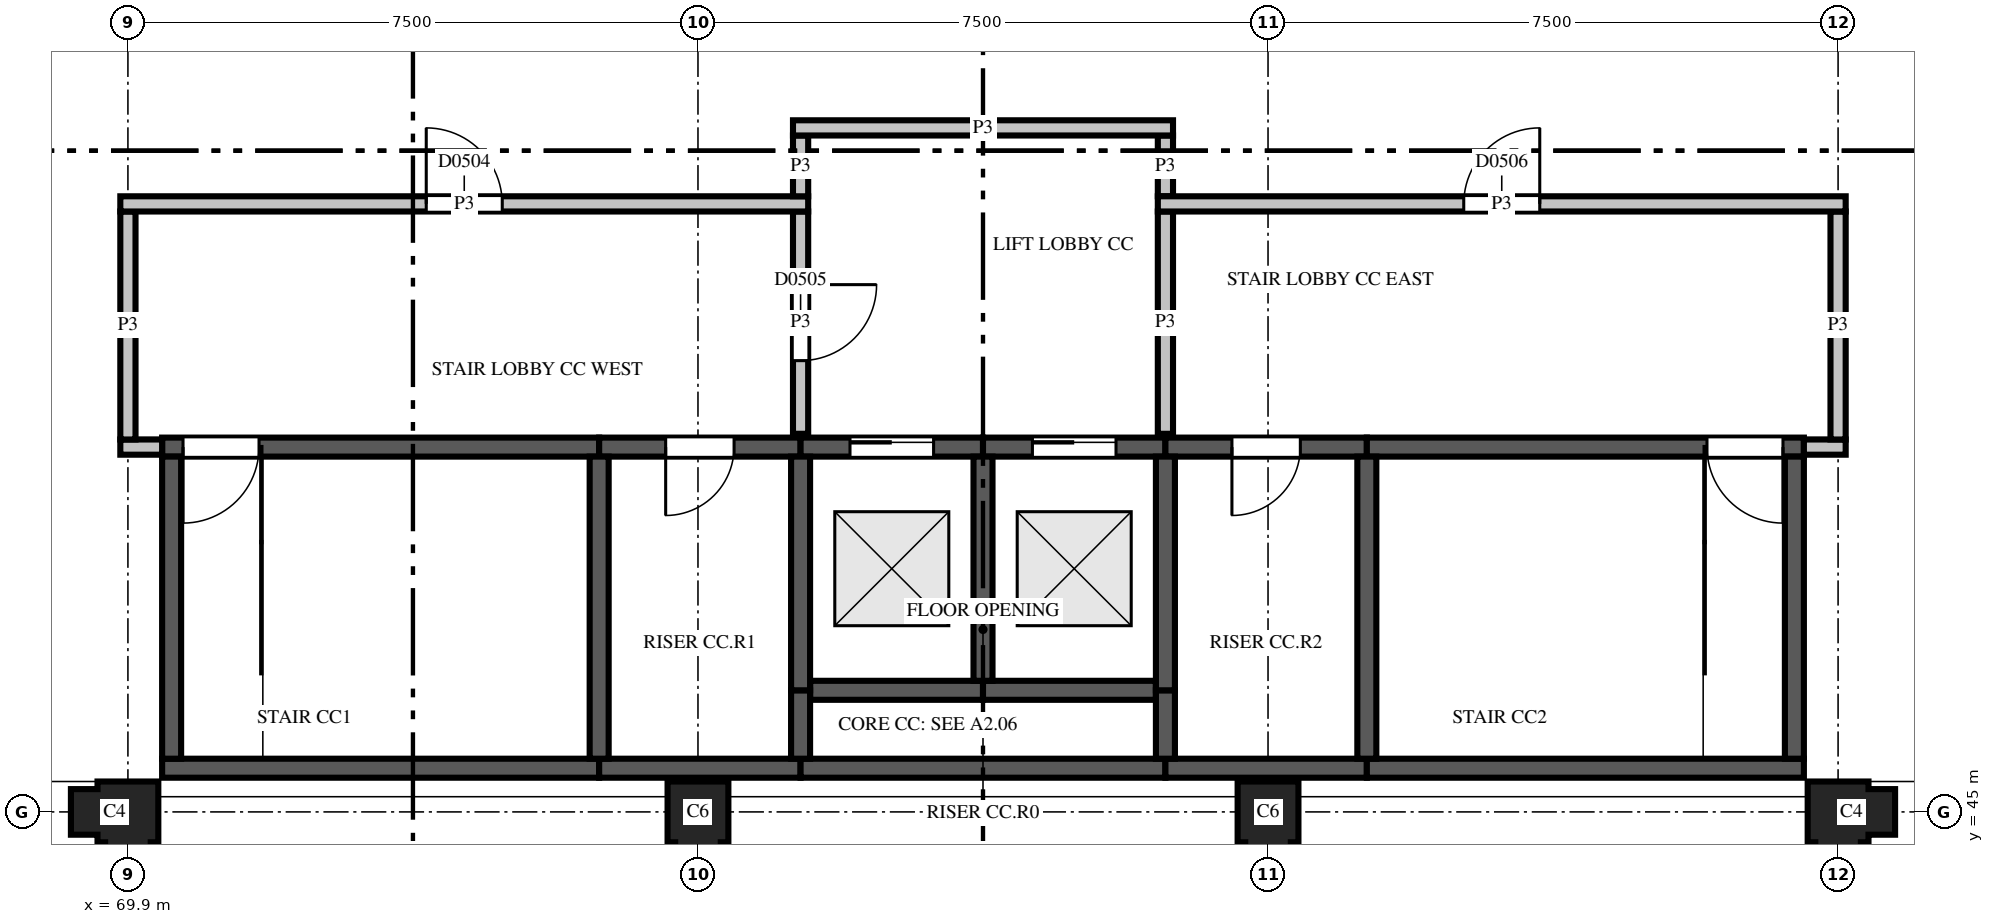
"""IFC4 building model, lengths in metres.
Left out: names, types, materials, properties, quantities, classifications, styles, units other than length and angle.
Written with IfcOpenShell. Run it as: python <this file> out.ifc"""

import sys

from ifc_helpers import new_model, si_unit, direction, frame, frame_2d, origin, place, context, subcontext, project, spatial, polyline, rectangle, outline, extrude, element, fill, save


model = new_model("IFC4")
c1 = context("Model", 3, precision=1e-05, world=origin(), true_north=direction((0.0, 1.0)))
c2 = subcontext(c1, "Body", "Model", "MODEL_VIEW")
j1 = project(units=[si_unit("LENGTHUNIT", "METRE"), si_unit("PLANEANGLEUNIT", "RADIAN")], contexts=[c1])
p1 = place(None, origin())
s1 = spatial("IfcSite", under=j1, at=p1, CompositionType="ELEMENT")
p2 = place(p1, origin())
s2 = spatial("IfcBuilding", under=s1, at=p2, CompositionType="ELEMENT")
p3 = place(p2, frame((0.0, 0.0, 19.3)))
s3 = spatial("IfcBuildingStorey", under=s2, at=p3, CompositionType="ELEMENT", Elevation=19.3)
p4 = place(p3, frame((69.9, 45.0, 0.0), z_axis=(0.0, 0.0, 1.0), x_axis=(-1.0, 0.0, 0.0)))
e1 = element("IfcColumn", 1, at=p4, inside=s3, PredefinedType="COLUMN", context=c2, shape_type="SweptSolid", body=[
    extrude(outline(polyline([(-0.4, -0.4), (0.4, -0.4), (0.4, -0.3), (0.75, -0.3), (0.75, 0.3), (0.4, 0.3), (0.4, 0.4), (0.3, 0.4), (0.3, 0.75), (-0.3, 0.75), (-0.3, 0.4), (-0.4, 0.4), (-0.4, -0.4)])), origin(), (0.0, 0.0, 1.0), 3.7),
])
for number, where, z_axis, x_axis in (
    (2, (77.4, 45.0, 0.0), (0.0, 0.0, 1.0), (0.0, -1.0, 0.0)),
    (3, (84.9, 45.0, 0.0), (0.0, 0.0, 1.0), (0.0, -1.0, 0.0)),
):
    element("IfcColumn", number, at=place(p3, frame(where, z_axis=z_axis, x_axis=x_axis)), inside=s3, PredefinedType="COLUMN", context=c2, shape_type="SweptSolid", body=[
        extrude(outline(polyline([(-0.4, -0.4), (0.4, -0.4), (0.4, -0.3), (0.75, -0.3), (0.75, 0.3), (0.4, 0.3), (0.4, 0.4), (-0.4, 0.4), (-0.4, -0.4)])), origin(), (0.0, 0.0, 1.0), 3.7),
    ])
p5 = place(p3, frame((92.4, 45.0, 0.0), z_axis=(0.0, 0.0, 1.0), x_axis=(0.0, -1.0, 0.0)))
e4 = element("IfcColumn", 4, at=p5, inside=s3, PredefinedType="COLUMN", context=c2, shape_type="SweptSolid", body=[
    extrude(outline(polyline([(-0.4, -0.4), (0.4, -0.4), (0.4, -0.3), (0.75, -0.3), (0.75, 0.3), (0.4, 0.3), (0.4, 0.4), (0.3, 0.4), (0.3, 0.75), (-0.3, 0.75), (-0.3, 0.4), (-0.4, 0.4), (-0.4, -0.4)])), origin(), (0.0, 0.0, 1.0), 3.7),
])
p6 = place(p3, frame((70.35, 45.575, 0.0), z_axis=(0.0, 0.0, 1.0), x_axis=(1.0, 0.0, 0.0)))
e5 = element("IfcWall", 5, at=p6, inside=s3, PredefinedType="SHEAR", context=c2, shape_type="SweptSolid", body=[
    extrude(rectangle(XDim=5.75, YDim=0.25, at=frame_2d((2.875, 0.0))), origin(), (0.0, 0.0, 1.0), 3.45),
])
p7 = place(p3, frame((76.1, 45.575, 0.0), z_axis=(0.0, 0.0, 1.0), x_axis=(1.0, 0.0, 0.0)))
e6 = element("IfcWall", 6, at=p7, inside=s3, PredefinedType="SHEAR", context=c2, shape_type="SweptSolid", body=[
    extrude(rectangle(XDim=2.65, YDim=0.25, at=frame_2d((1.325, 0.0))), origin(), (0.0, 0.0, 1.0), 3.45),
])
p8 = place(p3, frame((78.75, 45.575, 0.0), z_axis=(0.0, 0.0, 1.0), x_axis=(1.0, 0.0, 0.0)))
e7 = element("IfcWall", 7, at=p8, inside=s3, PredefinedType="SHEAR", context=c2, shape_type="SweptSolid", body=[
    extrude(rectangle(XDim=4.8, YDim=0.25, at=frame_2d((2.4, 0.0))), origin(), (0.0, 0.0, 1.0), 3.45),
])
p9 = place(p3, frame((83.55, 45.575, 0.0), z_axis=(0.0, 0.0, 1.0), x_axis=(1.0, 0.0, 0.0)))
e8 = element("IfcWall", 8, at=p9, inside=s3, PredefinedType="SHEAR", context=c2, shape_type="SweptSolid", body=[
    extrude(rectangle(XDim=2.65, YDim=0.25, at=frame_2d((1.325, 0.0))), origin(), (0.0, 0.0, 1.0), 3.45),
])
p10 = place(p3, frame((86.2, 45.575, 0.0), z_axis=(0.0, 0.0, 1.0), x_axis=(1.0, 0.0, 0.0)))
e9 = element("IfcWall", 9, at=p10, inside=s3, PredefinedType="SHEAR", context=c2, shape_type="SweptSolid", body=[
    extrude(rectangle(XDim=5.75, YDim=0.25, at=frame_2d((2.875, 0.0))), origin(), (0.0, 0.0, 1.0), 3.45),
])
p11 = place(p3, frame((78.875, 46.6, 0.0), z_axis=(0.0, 0.0, 1.0), x_axis=(1.0, 0.0, 0.0)))
e10 = element("IfcWall", 10, at=p11, inside=s3, PredefinedType="SHEAR", context=c2, shape_type="SweptSolid", body=[
    extrude(rectangle(XDim=2.275, YDim=0.25, at=frame_2d((1.137, 0.0))), origin(), (0.0, 0.0, 1.0), 4.95),
])
p12 = place(p3, frame((81.15, 46.6, 0.0), z_axis=(0.0, 0.0, 1.0), x_axis=(1.0, 0.0, 0.0)))
e11 = element("IfcWall", 11, at=p12, inside=s3, PredefinedType="SHEAR", context=c2, shape_type="SweptSolid", body=[
    extrude(rectangle(XDim=2.275, YDim=0.25, at=frame_2d((1.138, 0.0))), origin(), (0.0, 0.0, 1.0), 4.95),
])
p13 = place(p3, frame((70.35, 49.8, 0.0), z_axis=(0.0, 0.0, 1.0), x_axis=(1.0, 0.0, 0.0)))
e12 = element("IfcWall", 12, at=p13, inside=s3, PredefinedType="SHEAR", context=c2, shape_type="SweptSolid", body=[
    extrude(rectangle(XDim=5.75, YDim=0.25, at=frame_2d((2.875, 0.0))), origin(), (0.0, 0.0, 1.0), 3.45),
])
p14 = place(p13, frame((0.275, 0.0, 0.0)))
e13 = element("IfcOpeningElement", 13, at=p14, cuts=e12, PredefinedType="OPENING", context=c2, shape_type="SweptSolid", body=[
    extrude(rectangle(XDim=1.0, YDim=2.1, at=frame_2d((0.5, 1.05))), frame((0.0, 0.135, 0.0), z_axis=(0.0, -1.0, 0.0), x_axis=(1.0, 0.0, 0.0)), (0.0, 0.0, 1.0), 0.27),
])
p15 = place(p3, frame((76.1, 49.8, 0.0), z_axis=(0.0, 0.0, 1.0), x_axis=(1.0, 0.0, 0.0)))
e14 = element("IfcWall", 14, at=p15, inside=s3, PredefinedType="SHEAR", context=c2, shape_type="SweptSolid", body=[
    extrude(rectangle(XDim=2.65, YDim=0.25, at=frame_2d((1.325, 0.0))), origin(), (0.0, 0.0, 1.0), 3.45),
])
p16 = place(p15, frame((0.875, 0.0, 0.0)))
e15 = element("IfcOpeningElement", 15, at=p16, cuts=e14, PredefinedType="OPENING", context=c2, shape_type="SweptSolid", body=[
    extrude(rectangle(XDim=0.9, YDim=2.1, at=frame_2d((0.45, 1.05))), frame((0.0, 0.135, 0.0), z_axis=(0.0, -1.0, 0.0), x_axis=(1.0, 0.0, 0.0)), (0.0, 0.0, 1.0), 0.27),
])
p17 = place(p3, frame((78.75, 49.8, 0.0), z_axis=(0.0, 0.0, 1.0), x_axis=(1.0, 0.0, 0.0)))
e16 = element("IfcWall", 16, at=p17, inside=s3, PredefinedType="SHEAR", context=c2, shape_type="SweptSolid", body=[
    extrude(rectangle(XDim=2.4, YDim=0.25, at=frame_2d((1.2, 0.0))), origin(), (0.0, 0.0, 1.0), 4.95),
])
p18 = place(p17, frame((0.65, 0.0, 0.0)))
e17 = element("IfcOpeningElement", 17, at=p18, cuts=e16, PredefinedType="OPENING", context=c2, shape_type="SweptSolid", body=[
    extrude(rectangle(XDim=1.1, YDim=2.1, at=frame_2d((0.55, 1.05))), frame((0.0, 0.135, 0.0), z_axis=(0.0, -1.0, 0.0), x_axis=(1.0, 0.0, 0.0)), (0.0, 0.0, 1.0), 0.27),
])
p19 = place(p3, frame((81.15, 49.8, 0.0), z_axis=(0.0, 0.0, 1.0), x_axis=(1.0, 0.0, 0.0)))
e18 = element("IfcWall", 18, at=p19, inside=s3, PredefinedType="SHEAR", context=c2, shape_type="SweptSolid", body=[
    extrude(rectangle(XDim=2.4, YDim=0.25, at=frame_2d((1.2, 0.0))), origin(), (0.0, 0.0, 1.0), 4.95),
])
p20 = place(p19, frame((0.65, 0.0, 0.0)))
e19 = element("IfcOpeningElement", 19, at=p20, cuts=e18, PredefinedType="OPENING", context=c2, shape_type="SweptSolid", body=[
    extrude(rectangle(XDim=1.1, YDim=2.1, at=frame_2d((0.55, 1.05))), frame((0.0, 0.135, 0.0), z_axis=(0.0, -1.0, 0.0), x_axis=(1.0, 0.0, 0.0)), (0.0, 0.0, 1.0), 0.27),
])
p21 = place(p3, frame((83.55, 49.8, 0.0), z_axis=(0.0, 0.0, 1.0), x_axis=(1.0, 0.0, 0.0)))
e20 = element("IfcWall", 20, at=p21, inside=s3, PredefinedType="SHEAR", context=c2, shape_type="SweptSolid", body=[
    extrude(rectangle(XDim=2.65, YDim=0.25, at=frame_2d((1.325, 0.0))), origin(), (0.0, 0.0, 1.0), 3.45),
])
p22 = place(p21, frame((0.875, 0.0, 0.0)))
e21 = element("IfcOpeningElement", 21, at=p22, cuts=e20, PredefinedType="OPENING", context=c2, shape_type="SweptSolid", body=[
    extrude(rectangle(XDim=0.9, YDim=2.1, at=frame_2d((0.45, 1.05))), frame((0.0, 0.135, 0.0), z_axis=(0.0, -1.0, 0.0), x_axis=(1.0, 0.0, 0.0)), (0.0, 0.0, 1.0), 0.27),
])
p23 = place(p3, frame((86.2, 49.8, 0.0), z_axis=(0.0, 0.0, 1.0), x_axis=(1.0, 0.0, 0.0)))
e22 = element("IfcWall", 22, at=p23, inside=s3, PredefinedType="SHEAR", context=c2, shape_type="SweptSolid", body=[
    extrude(rectangle(XDim=5.75, YDim=0.25, at=frame_2d((2.875, 0.0))), origin(), (0.0, 0.0, 1.0), 3.45),
])
p24 = place(p23, frame((4.475, 0.0, 0.0)))
e23 = element("IfcOpeningElement", 23, at=p24, cuts=e22, PredefinedType="OPENING", context=c2, shape_type="SweptSolid", body=[
    extrude(rectangle(XDim=1.0, YDim=2.1, at=frame_2d((0.5, 1.05))), frame((0.0, 0.135, 0.0), z_axis=(0.0, -1.0, 0.0), x_axis=(1.0, 0.0, 0.0)), (0.0, 0.0, 1.0), 0.27),
])
for number, where, z_axis, x_axis in (
    (24, (70.475, 45.7, 0.0), (0.0, 0.0, 1.0), (0.0, 1.0, 0.0)),
    (25, (76.1, 45.7, 0.0), (0.0, 0.0, 1.0), (0.0, 1.0, 0.0)),
):
    element("IfcWall", number, at=place(p3, frame(where, z_axis=z_axis, x_axis=x_axis)), inside=s3, PredefinedType="SHEAR", context=c2, shape_type="SweptSolid", body=[
        extrude(rectangle(XDim=3.975, YDim=0.25, at=frame_2d((1.988, 0.0))), origin(), (0.0, 0.0, 1.0), 3.45),
    ])
p25 = place(p3, frame((78.75, 45.7, 0.0), z_axis=(0.0, 0.0, 1.0), x_axis=(0.0, 1.0, 0.0)))
e26 = element("IfcWall", 26, at=p25, inside=s3, PredefinedType="SHEAR", context=c2, shape_type="SweptSolid", body=[
    extrude(rectangle(XDim=0.9, YDim=0.25, at=frame_2d((0.45, 0.0))), origin(), (0.0, 0.0, 1.0), 3.45),
])
p26 = place(p3, frame((78.75, 46.6, 0.0), z_axis=(0.0, 0.0, 1.0), x_axis=(0.0, 1.0, 0.0)))
e27 = element("IfcWall", 27, at=p26, inside=s3, PredefinedType="SHEAR", context=c2, shape_type="SweptSolid", body=[
    extrude(rectangle(XDim=3.075, YDim=0.25, at=frame_2d((1.538, 0.0))), origin(), (0.0, 0.0, 1.0), 4.95),
])
p27 = place(p3, frame((81.15, 46.725, 0.0), z_axis=(0.0, 0.0, 1.0), x_axis=(0.0, 1.0, 0.0)))
e28 = element("IfcWall", 28, at=p27, inside=s3, PredefinedType="SHEAR", context=c2, shape_type="SweptSolid", body=[
    extrude(rectangle(XDim=2.95, YDim=0.25, at=frame_2d((1.475, 0.0))), origin(), (0.0, 0.0, 1.0), 4.95),
])
p28 = place(p3, frame((83.55, 45.7, 0.0), z_axis=(0.0, 0.0, 1.0), x_axis=(0.0, 1.0, 0.0)))
e29 = element("IfcWall", 29, at=p28, inside=s3, PredefinedType="SHEAR", context=c2, shape_type="SweptSolid", body=[
    extrude(rectangle(XDim=0.9, YDim=0.25, at=frame_2d((0.45, 0.0))), origin(), (0.0, 0.0, 1.0), 3.45),
])
p29 = place(p3, frame((83.55, 46.6, 0.0), z_axis=(0.0, 0.0, 1.0), x_axis=(0.0, 1.0, 0.0)))
e30 = element("IfcWall", 30, at=p29, inside=s3, PredefinedType="SHEAR", context=c2, shape_type="SweptSolid", body=[
    extrude(rectangle(XDim=3.075, YDim=0.25, at=frame_2d((1.538, 0.0))), origin(), (0.0, 0.0, 1.0), 4.95),
])
for number, where, z_axis, x_axis in (
    (31, (86.2, 45.7, 0.0), (0.0, 0.0, 1.0), (0.0, 1.0, 0.0)),
    (32, (91.825, 45.7, 0.0), (0.0, 0.0, 1.0), (0.0, 1.0, 0.0)),
):
    element("IfcWall", number, at=place(p3, frame(where, z_axis=z_axis, x_axis=x_axis)), inside=s3, PredefinedType="SHEAR", context=c2, shape_type="SweptSolid", body=[
        extrude(rectangle(XDim=3.975, YDim=0.25, at=frame_2d((1.988, 0.0))), origin(), (0.0, 0.0, 1.0), 3.45),
    ])
for number, where, z_axis, x_axis in (
    (33, (69.8, 49.8, 0.0), (0.0, 0.0, 1.0), (1.0, 0.0, 0.0)),
    (34, (91.95, 49.8, 0.0), (0.0, 0.0, 1.0), (1.0, 0.0, 0.0)),
):
    element("IfcWall", number, at=place(p3, frame(where, z_axis=z_axis, x_axis=x_axis)), inside=s3, PredefinedType="PARTITIONING", context=c2, shape_type="SweptSolid", body=[
        extrude(rectangle(XDim=0.55, YDim=0.2, at=frame_2d((0.275, 0.0))), origin(), (0.0, 0.0, 1.0), 2.88),
    ])
p30 = place(p3, frame((92.4, 49.9, 0.0), z_axis=(0.0, 0.0, 1.0), x_axis=(0.0, 1.0, 0.0)))
e35 = element("IfcWall", 35, at=p30, inside=s3, PredefinedType="PARTITIONING", context=c2, shape_type="SweptSolid", body=[
    extrude(rectangle(XDim=3.0, YDim=0.2, at=frame_2d((1.5, 0.0))), origin(), (0.0, 0.0, 1.0), 2.88),
])
p31 = place(p3, frame((78.75, 49.975, 0.0), z_axis=(0.0, 0.0, 1.0), x_axis=(0.0, 1.0, 0.0)))
e36 = element("IfcWall", 36, at=p31, inside=s3, PredefinedType="PARTITIONING", context=c2, shape_type="SweptSolid", body=[
    extrude(rectangle(XDim=2.925, YDim=0.2, at=frame_2d((1.462, 0.0))), origin(), (0.0, 0.0, 1.0), 2.88),
])
p32 = place(p31, frame((0.962, 0.0, 0.0)))
e37 = element("IfcOpeningElement", 37, at=p32, cuts=e36, PredefinedType="OPENING", context=c2, shape_type="SweptSolid", body=[
    extrude(rectangle(XDim=1.0, YDim=2.1, at=frame_2d((0.5, 1.05))), frame((0.0, 0.11, 0.0), z_axis=(0.0, -1.0, 0.0), x_axis=(1.0, 0.0, 0.0)), (0.0, 0.0, 1.0), 0.22),
])
p33 = place(p3, frame((83.55, 49.975, 0.0), z_axis=(0.0, 0.0, 1.0), x_axis=(0.0, 1.0, 0.0)))
e38 = element("IfcWall", 38, at=p33, inside=s3, PredefinedType="PARTITIONING", context=c2, shape_type="SweptSolid", body=[
    extrude(rectangle(XDim=2.925, YDim=0.2, at=frame_2d((1.462, 0.0))), origin(), (0.0, 0.0, 1.0), 2.88),
])
p34 = place(p3, frame((69.9, 52.9, 0.0), z_axis=(0.0, 0.0, 1.0), x_axis=(0.0, -1.0, 0.0)))
e39 = element("IfcWall", 39, at=p34, inside=s3, PredefinedType="PARTITIONING", context=c2, shape_type="SweptSolid", body=[
    extrude(rectangle(XDim=3.0, YDim=0.2, at=frame_2d((1.5, 0.0))), origin(), (0.0, 0.0, 1.0), 2.88),
])
p35 = place(p3, frame((78.85, 53.0, 0.0), z_axis=(0.0, 0.0, 1.0), x_axis=(-1.0, 0.0, 0.0)))
e40 = element("IfcWall", 40, at=p35, inside=s3, PredefinedType="PARTITIONING", context=c2, shape_type="SweptSolid", body=[
    extrude(rectangle(XDim=9.05, YDim=0.2, at=frame_2d((4.525, 0.0))), origin(), (0.0, 0.0, 1.0), 2.88),
])
p36 = place(p35, frame((4.025, 0.0, 0.0)))
e41 = element("IfcOpeningElement", 41, at=p36, cuts=e40, PredefinedType="OPENING", context=c2, shape_type="SweptSolid", body=[
    extrude(rectangle(XDim=1.0, YDim=2.1, at=frame_2d((0.5, 1.05))), frame((0.0, 0.11, 0.0), z_axis=(0.0, -1.0, 0.0), x_axis=(1.0, 0.0, 0.0)), (0.0, 0.0, 1.0), 0.22),
])
p37 = place(p3, frame((83.55, 53.1, 0.0), z_axis=(0.0, 0.0, 1.0), x_axis=(0.0, 1.0, 0.0)))
e42 = element("IfcWall", 42, at=p37, inside=s3, PredefinedType="PARTITIONING", context=c2, shape_type="SweptSolid", body=[
    extrude(rectangle(XDim=0.8, YDim=0.2, at=frame_2d((0.4, 0.0))), origin(), (0.0, 0.0, 1.0), 2.88),
])
p38 = place(p3, frame((92.5, 53.0, 0.0), z_axis=(0.0, 0.0, 1.0), x_axis=(-1.0, 0.0, 0.0)))
e43 = element("IfcWall", 43, at=p38, inside=s3, PredefinedType="PARTITIONING", context=c2, shape_type="SweptSolid", body=[
    extrude(rectangle(XDim=9.05, YDim=0.2, at=frame_2d((4.525, 0.0))), origin(), (0.0, 0.0, 1.0), 2.88),
])
p39 = place(p38, frame((4.025, 0.0, 0.0)))
e44 = element("IfcOpeningElement", 44, at=p39, cuts=e43, PredefinedType="OPENING", context=c2, shape_type="SweptSolid", body=[
    extrude(rectangle(XDim=1.0, YDim=2.1, at=frame_2d((0.5, 1.05))), frame((0.0, 0.11, 0.0), z_axis=(0.0, -1.0, 0.0), x_axis=(1.0, 0.0, 0.0)), (0.0, 0.0, 1.0), 0.22),
])
p40 = place(p3, frame((78.75, 53.9, 0.0), z_axis=(0.0, 0.0, 1.0), x_axis=(0.0, -1.0, 0.0)))
e45 = element("IfcWall", 45, at=p40, inside=s3, PredefinedType="PARTITIONING", context=c2, shape_type="SweptSolid", body=[
    extrude(rectangle(XDim=0.8, YDim=0.2, at=frame_2d((0.4, 0.0))), origin(), (0.0, 0.0, 1.0), 2.88),
])
p41 = place(p3, frame((83.65, 54.0, 0.0), z_axis=(0.0, 0.0, 1.0), x_axis=(-1.0, 0.0, 0.0)))
e46 = element("IfcWall", 46, at=p41, inside=s3, PredefinedType="PARTITIONING", context=c2, shape_type="SweptSolid", body=[
    extrude(rectangle(XDim=5.0, YDim=0.2, at=frame_2d((2.5, 0.0))), origin(), (0.0, 0.0, 1.0), 2.88),
])
p42 = place(p36, frame((1.0, 0.0, 0.0), z_axis=(0.0, 0.0, 1.0), x_axis=(-1.0, 0.0, 0.0)))
e47 = element("IfcDoor", 47, at=p42, inside=s3, OperationType="SINGLE_SWING_RIGHT", PredefinedType="DOOR", context=c2, shape_type="SweptSolid", body=[
    extrude(rectangle(XDim=1.0, YDim=2.1, at=frame_2d((0.5, 1.05))), frame((0.0, 0.025, 0.0), z_axis=(0.0, -1.0, 0.0), x_axis=(1.0, 0.0, 0.0)), (0.0, 0.0, 1.0), 0.05),
])
fill(e41, e47)
p43 = place(p32, origin())
e48 = element("IfcDoor", 48, at=p43, inside=s3, OperationType="SINGLE_SWING_RIGHT", PredefinedType="DOOR", context=c2, shape_type="SweptSolid", body=[
    extrude(rectangle(XDim=1.0, YDim=2.1, at=frame_2d((0.5, 1.05))), frame((0.0, 0.025, 0.0), z_axis=(0.0, -1.0, 0.0), x_axis=(1.0, 0.0, 0.0)), (0.0, 0.0, 1.0), 0.05),
])
fill(e37, e48)
p44 = place(p39, frame((1.0, 0.0, 0.0), z_axis=(0.0, 0.0, 1.0), x_axis=(-1.0, 0.0, 0.0)))
e49 = element("IfcDoor", 49, at=p44, inside=s3, OperationType="SINGLE_SWING_LEFT", PredefinedType="DOOR", context=c2, shape_type="SweptSolid", body=[
    extrude(rectangle(XDim=1.0, YDim=2.1, at=frame_2d((0.5, 1.05))), frame((0.0, 0.025, 0.0), z_axis=(0.0, -1.0, 0.0), x_axis=(1.0, 0.0, 0.0)), (0.0, 0.0, 1.0), 0.05),
])
fill(e44, e49)
p45 = place(p18, origin())
e50 = element("IfcDoor", 50, at=p45, inside=s3, OperationType="SLIDING_TO_LEFT", PredefinedType="DOOR", context=c2, shape_type="SweptSolid", body=[
    extrude(rectangle(XDim=1.1, YDim=2.1, at=frame_2d((0.55, 1.05))), frame((0.0, 0.025, 0.0), z_axis=(0.0, -1.0, 0.0), x_axis=(1.0, 0.0, 0.0)), (0.0, 0.0, 1.0), 0.05),
])
fill(e17, e50)
p46 = place(p20, origin())
e51 = element("IfcDoor", 51, at=p46, inside=s3, OperationType="SLIDING_TO_LEFT", PredefinedType="DOOR", context=c2, shape_type="SweptSolid", body=[
    extrude(rectangle(XDim=1.1, YDim=2.1, at=frame_2d((0.55, 1.05))), frame((0.0, 0.025, 0.0), z_axis=(0.0, -1.0, 0.0), x_axis=(1.0, 0.0, 0.0)), (0.0, 0.0, 1.0), 0.05),
])
fill(e19, e51)
p47 = place(p14, origin())
e52 = element("IfcDoor", 52, at=p47, inside=s3, OperationType="SINGLE_SWING_LEFT", PredefinedType="DOOR", context=c2, shape_type="SweptSolid", body=[
    extrude(rectangle(XDim=1.0, YDim=2.1, at=frame_2d((0.5, 1.05))), frame((0.0, 0.025, 0.0), z_axis=(0.0, -1.0, 0.0), x_axis=(1.0, 0.0, 0.0)), (0.0, 0.0, 1.0), 0.05),
])
fill(e13, e52)
p48 = place(p24, origin())
e53 = element("IfcDoor", 53, at=p48, inside=s3, OperationType="SINGLE_SWING_RIGHT", PredefinedType="DOOR", context=c2, shape_type="SweptSolid", body=[
    extrude(rectangle(XDim=1.0, YDim=2.1, at=frame_2d((0.5, 1.05))), frame((0.0, 0.025, 0.0), z_axis=(0.0, -1.0, 0.0), x_axis=(1.0, 0.0, 0.0)), (0.0, 0.0, 1.0), 0.05),
])
fill(e23, e53)
p49 = place(p16, origin())
e54 = element("IfcDoor", 54, at=p49, inside=s3, OperationType="SINGLE_SWING_LEFT", PredefinedType="DOOR", context=c2, shape_type="SweptSolid", body=[
    extrude(rectangle(XDim=0.9, YDim=2.1, at=frame_2d((0.45, 1.05))), frame((0.0, 0.025, 0.0), z_axis=(0.0, -1.0, 0.0), x_axis=(1.0, 0.0, 0.0)), (0.0, 0.0, 1.0), 0.05),
])
fill(e15, e54)
p50 = place(p22, origin())
e55 = element("IfcDoor", 55, at=p50, inside=s3, OperationType="SINGLE_SWING_LEFT", PredefinedType="DOOR", context=c2, shape_type="SweptSolid", body=[
    extrude(rectangle(XDim=0.9, YDim=2.1, at=frame_2d((0.45, 1.05))), frame((0.0, 0.025, 0.0), z_axis=(0.0, -1.0, 0.0), x_axis=(1.0, 0.0, 0.0)), (0.0, 0.0, 1.0), 0.05),
])
fill(e21, e55)
save(model, sys.argv[1])
